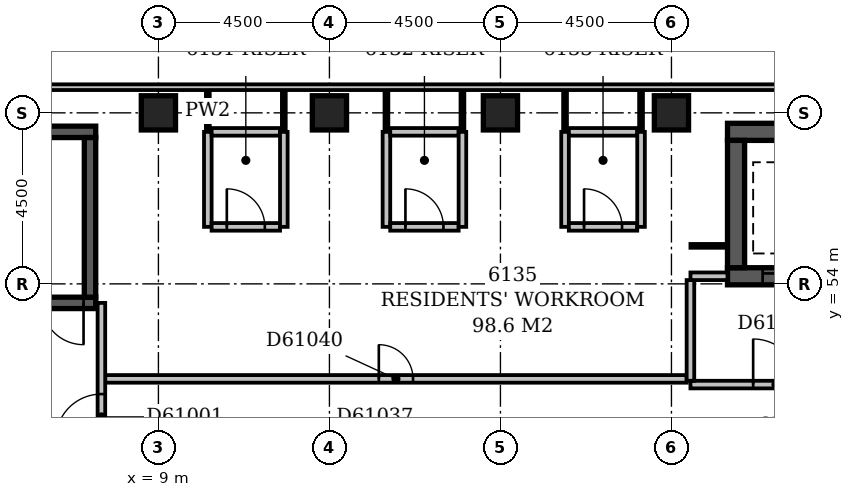
"""IFC4 building model, lengths in metres.
Left out: names, types, materials, properties, quantities, classifications, styles, units other than length and angle.
Written with IfcOpenShell. Run it as: python <this file> out.ifc"""

import sys

from ifc_helpers import new_model, si_unit, direction, frame, frame_2d, origin, origin_2d, place, context, subcontext, project, spatial, rectangle, extrude, element, fill, save


model = new_model("IFC4")
c1 = context("Model", 3, precision=1e-05, world=origin(), true_north=direction((0.0, 1.0)))
c2 = subcontext(c1, "Body", "Model", "MODEL_VIEW")
j1 = project(units=[si_unit("LENGTHUNIT", "METRE"), si_unit("PLANEANGLEUNIT", "RADIAN")], contexts=[c1])
p1 = place(None, origin())
s1 = spatial("IfcSite", under=j1, at=p1, CompositionType="ELEMENT")
p2 = place(p1, origin())
s2 = spatial("IfcBuilding", under=s1, at=p2, CompositionType="ELEMENT")
p3 = place(p2, frame((0.0, 0.0, 236.6)))
s3 = spatial("IfcBuildingStorey", under=s2, at=p3, CompositionType="ELEMENT", Elevation=236.6)
p4 = place(p3, frame((0.35, 53.5, -0.3), z_axis=(0.0, 0.0, 1.0), x_axis=(1.0, 0.0, 0.0)))
e1 = element("IfcWall", 1, at=p4, inside=s3, PredefinedType="SHEAR", context=c2, shape_type="SweptSolid", body=[
    extrude(rectangle(XDim=7.0, YDim=0.3, at=frame_2d((3.5, 0.0))), origin(), (0.0, 0.0, 1.0), 3.6),
])
p5 = place(p4, frame((5.58, 0.0, 0.3)))
e2 = element("IfcOpeningElement", 2, at=p5, cuts=e1, PredefinedType="OPENING", context=c2, shape_type="SweptSolid", body=[
    extrude(rectangle(XDim=1.1, YDim=2.1, at=frame_2d((0.55, 1.05))), frame((0.0, 0.162, 0.0), z_axis=(0.0, -1.0, 0.0), x_axis=(1.0, 0.0, 0.0)), (0.0, 0.0, 1.0), 0.324),
])
p6 = place(p3, frame((0.35, 58.0, -0.3), z_axis=(0.0, 0.0, 1.0), x_axis=(1.0, 0.0, 0.0)))
e3 = element("IfcWall", 3, at=p6, inside=s3, PredefinedType="SHEAR", context=c2, shape_type="SweptSolid", body=[
    extrude(rectangle(XDim=7.0, YDim=0.3, at=frame_2d((3.5, 0.0))), origin(), (0.0, 0.0, 1.0), 3.6),
])
p7 = place(p3, frame((7.2, 53.65, -0.3), z_axis=(0.0, 0.0, 1.0), x_axis=(0.0, 1.0, 0.0)))
e4 = element("IfcWall", 4, at=p7, inside=s3, PredefinedType="SHEAR", context=c2, shape_type="SweptSolid", body=[
    extrude(rectangle(XDim=4.2, YDim=0.3, at=frame_2d((2.1, 0.0))), origin(), (0.0, 0.0, 1.0), 3.6),
])
p8 = place(p3, frame((23.975, 54.2, -0.3), z_axis=(0.0, 0.0, 1.0), x_axis=(1.0, 0.0, 0.0)))
e5 = element("IfcWall", 5, at=p8, inside=s3, PredefinedType="SHEAR", context=c2, shape_type="SweptSolid", body=[
    extrude(rectangle(XDim=2.95, YDim=0.45, at=frame_2d((1.475, 0.0))), origin(), (0.0, 0.0, 1.0), 3.6),
])
p9 = place(p8, frame((0.925, 0.0, 0.3)))
e6 = element("IfcOpeningElement", 6, at=p9, cuts=e5, PredefinedType="OPENING", context=c2, shape_type="SweptSolid", body=[
    extrude(rectangle(XDim=1.1, YDim=2.1, at=frame_2d((0.55, 1.05))), frame((0.0, 0.237, 0.0), z_axis=(0.0, -1.0, 0.0), x_axis=(1.0, 0.0, 0.0)), (0.0, 0.0, 1.0), 0.474),
])
p10 = place(p3, frame((23.975, 58.0, -0.3), z_axis=(0.0, 0.0, 1.0), x_axis=(1.0, 0.0, 0.0)))
e7 = element("IfcWall", 7, at=p10, inside=s3, PredefinedType="SHEAR", context=c2, shape_type="SweptSolid", body=[
    extrude(rectangle(XDim=2.95, YDim=0.45, at=frame_2d((1.475, 0.0))), origin(), (0.0, 0.0, 1.0), 3.6),
])
p11 = place(p3, frame((24.2, 54.425, -0.3), z_axis=(0.0, 0.0, 1.0), x_axis=(0.0, 1.0, 0.0)))
e8 = element("IfcWall", 8, at=p11, inside=s3, PredefinedType="SHEAR", context=c2, shape_type="SweptSolid", body=[
    extrude(rectangle(XDim=3.35, YDim=0.45, at=frame_2d((1.675, 0.0))), origin(), (0.0, 0.0, 1.0), 3.6),
])
for number, where, z_axis, x_axis in (
    (9, (9.0, 58.5, -0.3), (0.0, 0.0, 1.0), (1.0, 0.0, 0.0)),
    (10, (13.5, 58.5, -0.3), (0.0, 0.0, 1.0), (1.0, 0.0, 0.0)),
    (11, (18.0, 58.5, -0.3), (0.0, 0.0, 1.0), (1.0, 0.0, 0.0)),
    (12, (22.5, 58.5, -0.3), (0.0, 0.0, 1.0), (1.0, 0.0, 0.0)),
):
    element("IfcColumn", number, at=place(p3, frame(where, z_axis=z_axis, x_axis=x_axis)), inside=s3, PredefinedType="COLUMN", context=c2, shape_type="SweptSolid", body=[
        extrude(rectangle(XDim=0.9, YDim=0.9, at=origin_2d()), origin(), (0.0, 0.0, 1.0), 3.6),
    ])
p12 = place(p3, frame((45.6, 59.175, 0.0), z_axis=(0.0, 0.0, 1.0), x_axis=(-1.0, 0.0, 0.0)))
e13 = element("IfcWall", 13, at=p12, inside=s3, PredefinedType="STANDARD", context=c2, shape_type="SweptSolid", body=[
    extrude(rectangle(XDim=46.35, YDim=0.15, at=frame_2d((23.175, 0.0))), origin(), (0.0, 0.0, 1.0), 2.7),
])
p13 = place(p12, frame((15.15, 0.0, 0.6)))
e14 = element("IfcOpeningElement", 14, at=p13, cuts=e13, PredefinedType="OPENING", context=c2, shape_type="SweptSolid", body=[
    extrude(rectangle(XDim=2.4, YDim=1.8, at=frame_2d((1.2, 0.9))), frame((0.0, 0.087, 0.0), z_axis=(0.0, -1.0, 0.0), x_axis=(1.0, 0.0, 0.0)), (0.0, 0.0, 1.0), 0.174),
])
p14 = place(p3, frame((23.0, 51.35, 0.0), z_axis=(0.0, 0.0, 1.0), x_axis=(1.0, 0.0, 0.0)))
e15 = element("IfcWall", 15, at=p14, inside=s3, PredefinedType="PARTITIONING", context=c2, shape_type="SweptSolid", body=[
    extrude(rectangle(XDim=4.8, YDim=0.2, at=frame_2d((2.4, 0.0))), origin(), (0.0, 0.0, 1.0), 3.3),
])
p15 = place(p14, frame((1.65, 0.0, 0.0)))
e16 = element("IfcOpeningElement", 16, at=p15, cuts=e15, PredefinedType="OPENING", context=c2, shape_type="SweptSolid", body=[
    extrude(rectangle(XDim=1.2, YDim=2.1, at=frame_2d((0.6, 1.05))), frame((0.0, 0.112, 0.0), z_axis=(0.0, -1.0, 0.0), x_axis=(1.0, 0.0, 0.0)), (0.0, 0.0, 1.0), 0.224),
])
p16 = place(p3, frame((23.0, 54.2, 0.0), z_axis=(0.0, 0.0, 1.0), x_axis=(1.0, 0.0, 0.0)))
e17 = element("IfcWall", 17, at=p16, inside=s3, PredefinedType="PARTITIONING", context=c2, shape_type="SweptSolid", body=[
    extrude(rectangle(XDim=0.975, YDim=0.2, at=frame_2d((0.488, 0.0))), origin(), (0.0, 0.0, 1.0), 3.3),
])
p17 = place(p3, frame((23.0, 51.45, 0.0), z_axis=(0.0, 0.0, 1.0), x_axis=(0.0, 1.0, 0.0)))
e18 = element("IfcWall", 18, at=p17, inside=s3, PredefinedType="PARTITIONING", context=c2, shape_type="SweptSolid", body=[
    extrude(rectangle(XDim=2.65, YDim=0.2, at=frame_2d((1.325, 0.0))), origin(), (0.0, 0.0, 1.0), 3.3),
])
p18 = place(p3, frame((7.5, 49.6, 0.0), z_axis=(0.0, 0.0, 1.0), x_axis=(0.0, 1.0, 0.0)))
e19 = element("IfcWall", 19, at=p18, inside=s3, PredefinedType="PARTITIONING", context=c2, shape_type="SweptSolid", body=[
    extrude(rectangle(XDim=3.9, YDim=0.2, at=frame_2d((1.95, 0.0))), origin(), (0.0, 0.0, 1.0), 3.3),
])
p19 = place(p18, frame((0.3, 0.0, 0.0)))
e20 = element("IfcOpeningElement", 20, at=p19, cuts=e19, PredefinedType="OPENING", context=c2, shape_type="SweptSolid", body=[
    extrude(rectangle(XDim=1.2, YDim=2.1, at=frame_2d((0.6, 1.05))), frame((0.0, 0.112, 0.0), z_axis=(0.0, -1.0, 0.0), x_axis=(1.0, 0.0, 0.0)), (0.0, 0.0, 1.0), 0.224),
])
p20 = place(p3, frame((7.6, 51.5, 0.0), z_axis=(0.0, 0.0, 1.0), x_axis=(1.0, 0.0, 0.0)))
e21 = element("IfcWall", 21, at=p20, inside=s3, PredefinedType="PARTITIONING", context=c2, shape_type="SweptSolid", body=[
    extrude(rectangle(XDim=15.3, YDim=0.2, at=frame_2d((7.65, 0.0))), origin(), (0.0, 0.0, 1.0), 3.3),
])
p21 = place(p20, frame((7.2, 0.0, 0.0)))
e22 = element("IfcOpeningElement", 22, at=p21, cuts=e21, PredefinedType="OPENING", context=c2, shape_type="SweptSolid", body=[
    extrude(rectangle(XDim=0.9, YDim=2.1, at=frame_2d((0.45, 1.05))), frame((0.0, 0.112, 0.0), z_axis=(0.0, -1.0, 0.0), x_axis=(1.0, 0.0, 0.0)), (0.0, 0.0, 1.0), 0.224),
])
p22 = place(p3, frame((23.0, 55.0, 0.0), z_axis=(0.0, 0.0, 1.0), x_axis=(1.0, 0.0, 0.0)))
e23 = element("IfcWall", 23, at=p22, inside=s3, PredefinedType="PARTITIONING", context=c2, shape_type="SweptSolid", body=[
    extrude(rectangle(XDim=0.975, YDim=0.1, at=frame_2d((0.488, 0.0))), origin(), (0.0, 0.0, 1.0), 3.3),
])
p23 = place(p3, frame((10.3, 55.5, 0.0), z_axis=(0.0, 0.0, 1.0), x_axis=(0.0, 1.0, 0.0)))
e24 = element("IfcWall", 24, at=p23, inside=s3, PredefinedType="PARTITIONING", context=c2, shape_type="SweptSolid", body=[
    extrude(rectangle(XDim=2.5, YDim=0.2, at=frame_2d((1.25, 0.0))), origin(), (0.0, 0.0, 1.0), 3.3),
])
p24 = place(p3, frame((10.4, 55.5, 0.0), z_axis=(0.0, 0.0, 1.0), x_axis=(1.0, 0.0, 0.0)))
e25 = element("IfcWall", 25, at=p24, inside=s3, PredefinedType="PARTITIONING", context=c2, shape_type="SweptSolid", body=[
    extrude(rectangle(XDim=1.8, YDim=0.2, at=frame_2d((0.9, 0.0))), origin(), (0.0, 0.0, 1.0), 3.3),
])
p25 = place(p24, frame((0.4, 0.0, 0.0)))
e26 = element("IfcOpeningElement", 26, at=p25, cuts=e25, PredefinedType="OPENING", context=c2, shape_type="SweptSolid", body=[
    extrude(rectangle(XDim=1.0, YDim=2.1, at=frame_2d((0.5, 1.05))), frame((0.0, 0.112, 0.0), z_axis=(0.0, -1.0, 0.0), x_axis=(1.0, 0.0, 0.0)), (0.0, 0.0, 1.0), 0.224),
])
for number, where, z_axis, x_axis in (
    (27, (12.3, 55.5, 0.0), (0.0, 0.0, 1.0), (0.0, 1.0, 0.0)),
    (28, (15.0, 55.5, 0.0), (0.0, 0.0, 1.0), (0.0, 1.0, 0.0)),
):
    element("IfcWall", number, at=place(p3, frame(where, z_axis=z_axis, x_axis=x_axis)), inside=s3, PredefinedType="PARTITIONING", context=c2, shape_type="SweptSolid", body=[
        extrude(rectangle(XDim=2.5, YDim=0.2, at=frame_2d((1.25, 0.0))), origin(), (0.0, 0.0, 1.0), 3.3),
    ])
p26 = place(p3, frame((15.1, 55.5, 0.0), z_axis=(0.0, 0.0, 1.0), x_axis=(1.0, 0.0, 0.0)))
e29 = element("IfcWall", 29, at=p26, inside=s3, PredefinedType="PARTITIONING", context=c2, shape_type="SweptSolid", body=[
    extrude(rectangle(XDim=1.8, YDim=0.2, at=frame_2d((0.9, 0.0))), origin(), (0.0, 0.0, 1.0), 3.3),
])
p27 = place(p26, frame((0.4, 0.0, 0.0)))
e30 = element("IfcOpeningElement", 30, at=p27, cuts=e29, PredefinedType="OPENING", context=c2, shape_type="SweptSolid", body=[
    extrude(rectangle(XDim=1.0, YDim=2.1, at=frame_2d((0.5, 1.05))), frame((0.0, 0.112, 0.0), z_axis=(0.0, -1.0, 0.0), x_axis=(1.0, 0.0, 0.0)), (0.0, 0.0, 1.0), 0.224),
])
for number, where, z_axis, x_axis in (
    (31, (17.0, 55.5, 0.0), (0.0, 0.0, 1.0), (0.0, 1.0, 0.0)),
    (32, (19.7, 55.5, 0.0), (0.0, 0.0, 1.0), (0.0, 1.0, 0.0)),
):
    element("IfcWall", number, at=place(p3, frame(where, z_axis=z_axis, x_axis=x_axis)), inside=s3, PredefinedType="PARTITIONING", context=c2, shape_type="SweptSolid", body=[
        extrude(rectangle(XDim=2.5, YDim=0.2, at=frame_2d((1.25, 0.0))), origin(), (0.0, 0.0, 1.0), 3.3),
    ])
p28 = place(p3, frame((19.8, 55.5, 0.0), z_axis=(0.0, 0.0, 1.0), x_axis=(1.0, 0.0, 0.0)))
e33 = element("IfcWall", 33, at=p28, inside=s3, PredefinedType="PARTITIONING", context=c2, shape_type="SweptSolid", body=[
    extrude(rectangle(XDim=1.8, YDim=0.2, at=frame_2d((0.9, 0.0))), origin(), (0.0, 0.0, 1.0), 3.3),
])
p29 = place(p28, frame((0.4, 0.0, 0.0)))
e34 = element("IfcOpeningElement", 34, at=p29, cuts=e33, PredefinedType="OPENING", context=c2, shape_type="SweptSolid", body=[
    extrude(rectangle(XDim=1.0, YDim=2.1, at=frame_2d((0.5, 1.05))), frame((0.0, 0.112, 0.0), z_axis=(0.0, -1.0, 0.0), x_axis=(1.0, 0.0, 0.0)), (0.0, 0.0, 1.0), 0.224),
])
p30 = place(p3, frame((21.7, 55.5, 0.0), z_axis=(0.0, 0.0, 1.0), x_axis=(0.0, 1.0, 0.0)))
e35 = element("IfcWall", 35, at=p30, inside=s3, PredefinedType="PARTITIONING", context=c2, shape_type="SweptSolid", body=[
    extrude(rectangle(XDim=2.5, YDim=0.2, at=frame_2d((1.25, 0.0))), origin(), (0.0, 0.0, 1.0), 3.3),
])
p31 = place(p3, frame((10.3, 58.0, 0.0), z_axis=(0.0, 0.0, 1.0), x_axis=(0.0, 1.0, 0.0)))
e36 = element("IfcWall", 36, at=p31, inside=s3, PredefinedType="PARTITIONING", context=c2, shape_type="SweptSolid", body=[
    extrude(rectangle(XDim=1.1, YDim=0.1, at=frame_2d((0.55, 0.0))), origin(), (0.0, 0.0, 1.0), 3.3),
])
p32 = place(p3, frame((10.4, 58.0, 0.0), z_axis=(0.0, 0.0, 1.0), x_axis=(1.0, 0.0, 0.0)))
e37 = element("IfcWall", 37, at=p32, inside=s3, PredefinedType="PARTITIONING", context=c2, shape_type="SweptSolid", body=[
    extrude(rectangle(XDim=1.8, YDim=0.2, at=frame_2d((0.9, 0.0))), origin(), (0.0, 0.0, 1.0), 3.3),
])
for number, where, z_axis, x_axis in (
    (38, (12.3, 58.0, 0.0), (0.0, 0.0, 1.0), (0.0, 1.0, 0.0)),
    (39, (15.0, 58.0, 0.0), (0.0, 0.0, 1.0), (0.0, 1.0, 0.0)),
):
    element("IfcWall", number, at=place(p3, frame(where, z_axis=z_axis, x_axis=x_axis)), inside=s3, PredefinedType="PARTITIONING", context=c2, shape_type="SweptSolid", body=[
        extrude(rectangle(XDim=1.1, YDim=0.1, at=frame_2d((0.55, 0.0))), origin(), (0.0, 0.0, 1.0), 3.3),
    ])
p33 = place(p3, frame((15.1, 58.0, 0.0), z_axis=(0.0, 0.0, 1.0), x_axis=(1.0, 0.0, 0.0)))
e40 = element("IfcWall", 40, at=p33, inside=s3, PredefinedType="PARTITIONING", context=c2, shape_type="SweptSolid", body=[
    extrude(rectangle(XDim=1.8, YDim=0.2, at=frame_2d((0.9, 0.0))), origin(), (0.0, 0.0, 1.0), 3.3),
])
for number, where, z_axis, x_axis in (
    (41, (17.0, 58.0, 0.0), (0.0, 0.0, 1.0), (0.0, 1.0, 0.0)),
    (42, (19.7, 58.0, 0.0), (0.0, 0.0, 1.0), (0.0, 1.0, 0.0)),
):
    element("IfcWall", number, at=place(p3, frame(where, z_axis=z_axis, x_axis=x_axis)), inside=s3, PredefinedType="PARTITIONING", context=c2, shape_type="SweptSolid", body=[
        extrude(rectangle(XDim=1.1, YDim=0.1, at=frame_2d((0.55, 0.0))), origin(), (0.0, 0.0, 1.0), 3.3),
    ])
p34 = place(p3, frame((19.8, 58.0, 0.0), z_axis=(0.0, 0.0, 1.0), x_axis=(1.0, 0.0, 0.0)))
e43 = element("IfcWall", 43, at=p34, inside=s3, PredefinedType="PARTITIONING", context=c2, shape_type="SweptSolid", body=[
    extrude(rectangle(XDim=1.8, YDim=0.2, at=frame_2d((0.9, 0.0))), origin(), (0.0, 0.0, 1.0), 3.3),
])
p35 = place(p3, frame((21.7, 58.0, 0.0), z_axis=(0.0, 0.0, 1.0), x_axis=(0.0, 1.0, 0.0)))
e44 = element("IfcWall", 44, at=p35, inside=s3, PredefinedType="PARTITIONING", context=c2, shape_type="SweptSolid", body=[
    extrude(rectangle(XDim=1.1, YDim=0.1, at=frame_2d((0.55, 0.0))), origin(), (0.0, 0.0, 1.0), 3.3),
])
p36 = place(p19, origin())
e45 = element("IfcDoor", 45, at=p36, inside=s3, OperationType="SINGLE_SWING_LEFT", PredefinedType="DOOR", context=c2, shape_type="SweptSolid", body=[
    extrude(rectangle(XDim=1.2, YDim=2.1, at=frame_2d((0.6, 1.05))), frame((0.0, 0.025, 0.0), z_axis=(0.0, -1.0, 0.0), x_axis=(1.0, 0.0, 0.0)), (0.0, 0.0, 1.0), 0.05),
])
fill(e20, e45)
p37 = place(p15, origin())
e46 = element("IfcDoor", 46, at=p37, inside=s3, OperationType="SINGLE_SWING_LEFT", PredefinedType="DOOR", context=c2, shape_type="SweptSolid", body=[
    extrude(rectangle(XDim=1.2, YDim=2.1, at=frame_2d((0.6, 1.05))), frame((0.0, 0.025, 0.0), z_axis=(0.0, -1.0, 0.0), x_axis=(1.0, 0.0, 0.0)), (0.0, 0.0, 1.0), 0.05),
])
fill(e16, e46)
p38 = place(p9, origin())
e47 = element("IfcDoor", 47, at=p38, inside=s3, OperationType="SLIDING_TO_LEFT", PredefinedType="DOOR", context=c2, shape_type="SweptSolid", body=[
    extrude(rectangle(XDim=1.1, YDim=2.1, at=frame_2d((0.55, 1.05))), frame((0.0, 0.025, 0.0), z_axis=(0.0, -1.0, 0.0), x_axis=(1.0, 0.0, 0.0)), (0.0, 0.0, 1.0), 0.05),
])
fill(e6, e47)
p39 = place(p5, origin())
e48 = element("IfcDoor", 48, at=p39, inside=s3, OperationType="SINGLE_SWING_RIGHT", PredefinedType="DOOR", context=c2, shape_type="SweptSolid", body=[
    extrude(rectangle(XDim=1.1, YDim=2.1, at=frame_2d((0.55, 1.05))), frame((0.0, 0.025, 0.0), z_axis=(0.0, -1.0, 0.0), x_axis=(1.0, 0.0, 0.0)), (0.0, 0.0, 1.0), 0.05),
])
fill(e2, e48)
p40 = place(p21, origin())
e49 = element("IfcDoor", 49, at=p40, inside=s3, OperationType="SINGLE_SWING_LEFT", PredefinedType="DOOR", context=c2, shape_type="SweptSolid", body=[
    extrude(rectangle(XDim=0.9, YDim=2.1, at=frame_2d((0.45, 1.05))), frame((0.0, 0.025, 0.0), z_axis=(0.0, -1.0, 0.0), x_axis=(1.0, 0.0, 0.0)), (0.0, 0.0, 1.0), 0.05),
])
fill(e22, e49)
p41 = place(p25, origin())
e50 = element("IfcDoor", 50, at=p41, inside=s3, OperationType="SINGLE_SWING_LEFT", PredefinedType="DOOR", context=c2, shape_type="SweptSolid", body=[
    extrude(rectangle(XDim=1.0, YDim=2.1, at=frame_2d((0.5, 1.05))), frame((0.0, 0.025, 0.0), z_axis=(0.0, -1.0, 0.0), x_axis=(1.0, 0.0, 0.0)), (0.0, 0.0, 1.0), 0.05),
])
fill(e26, e50)
p42 = place(p27, origin())
e51 = element("IfcDoor", 51, at=p42, inside=s3, OperationType="SINGLE_SWING_LEFT", PredefinedType="DOOR", context=c2, shape_type="SweptSolid", body=[
    extrude(rectangle(XDim=1.0, YDim=2.1, at=frame_2d((0.5, 1.05))), frame((0.0, 0.025, 0.0), z_axis=(0.0, -1.0, 0.0), x_axis=(1.0, 0.0, 0.0)), (0.0, 0.0, 1.0), 0.05),
])
fill(e30, e51)
p43 = place(p29, origin())
e52 = element("IfcDoor", 52, at=p43, inside=s3, OperationType="SINGLE_SWING_LEFT", PredefinedType="DOOR", context=c2, shape_type="SweptSolid", body=[
    extrude(rectangle(XDim=1.0, YDim=2.1, at=frame_2d((0.5, 1.05))), frame((0.0, 0.025, 0.0), z_axis=(0.0, -1.0, 0.0), x_axis=(1.0, 0.0, 0.0)), (0.0, 0.0, 1.0), 0.05),
])
fill(e34, e52)
save(model, sys.argv[1])
